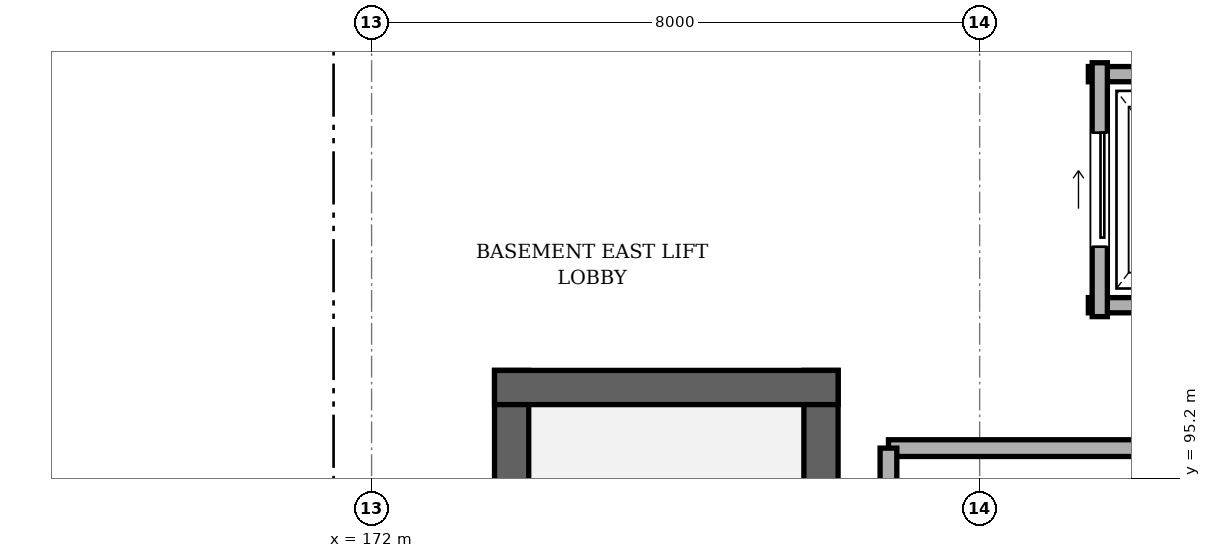
"""IFC4 building model, lengths in metres.
Left out: names, types, materials, properties, quantities, classifications, styles, units other than length and angle.
Written with IfcOpenShell. Run it as: python <this file> out.ifc"""

import sys

from ifc_helpers import new_model, si_unit, direction, frame, frame_2d, origin, place, context, subcontext, project, spatial, rectangle, extrude, element, fill, save


model = new_model("IFC4")
c1 = context("Model", 3, precision=1e-05, world=origin(), true_north=direction((0.0, 1.0)))
c2 = subcontext(c1, "Body", "Model", "MODEL_VIEW")
j1 = project(units=[si_unit("LENGTHUNIT", "METRE"), si_unit("PLANEANGLEUNIT", "RADIAN")], contexts=[c1])
p1 = place(None, origin())
s1 = spatial("IfcSite", under=j1, at=p1, CompositionType="ELEMENT")
p2 = place(p1, origin())
s2 = spatial("IfcBuilding", under=s1, at=p2, CompositionType="ELEMENT")
p3 = place(p2, frame((0.0, 0.0, -5.4)))
s3 = spatial("IfcBuildingStorey", under=s2, at=p3, CompositionType="ELEMENT", Elevation=-5.4)
for number, where, z_axis, x_axis in (
    (1, (177.913, 85.925, 0.0), (0.0, 0.0, 1.0), (0.0, 1.0, 0.0)),
    (2, (173.843, 96.623, 0.0), (0.0, 0.0, 1.0), (0.0, -1.0, 0.0)),
):
    element("IfcWall", number, at=place(p3, frame(where, z_axis=z_axis, x_axis=x_axis)), inside=s3, PredefinedType="SHEAR", context=c2, shape_type="SweptSolid", body=[
        extrude(rectangle(XDim=10.698, YDim=0.45, at=frame_2d((5.349, 0.0))), origin(), (0.0, 0.0, 1.0), 5.1),
    ])
p4 = place(p3, frame((178.137, 96.397, 0.0), z_axis=(0.0, 0.0, 1.0), x_axis=(-1.0, 0.0, 0.0)))
e3 = element("IfcWall", 3, at=p4, inside=s3, PredefinedType="SHEAR", context=c2, shape_type="SweptSolid", body=[
    extrude(rectangle(XDim=4.52, YDim=0.45, at=frame_2d((2.26, 0.0))), origin(), (0.0, 0.0, 1.0), 5.1),
])
for number, where, z_axis, x_axis in (
    (4, (181.43, 97.48, 0.0), (0.0, 0.0, 1.0), (1.0, 0.0, 0.0)),
    (5, (184.17, 100.52, 0.0), (0.0, 0.0, 1.0), (-1.0, 0.0, 0.0)),
):
    element("IfcWall", number, at=place(p3, frame(where, z_axis=z_axis, x_axis=x_axis)), inside=s3, PredefinedType="SOLIDWALL", context=c2, shape_type="SweptSolid", body=[
        extrude(rectangle(XDim=2.74, YDim=0.2, at=frame_2d((1.37, 0.0))), origin(), (0.0, 0.0, 1.0), 4.4),
    ])
p5 = place(p3, frame((181.58, 100.67, 0.0), z_axis=(0.0, 0.0, 1.0), x_axis=(0.0, -1.0, 0.0)))
e6 = element("IfcWall", 6, at=p5, inside=s3, PredefinedType="SOLIDWALL", context=c2, shape_type="SweptSolid", body=[
    extrude(rectangle(XDim=3.34, YDim=0.2, at=frame_2d((1.67, 0.0))), origin(), (0.0, 0.0, 1.0), 4.4),
])
p6 = place(p5, frame((0.92, 0.0, 0.0)))
e7 = element("IfcOpeningElement", 7, at=p6, cuts=e6, PredefinedType="OPENING", context=c2, shape_type="SweptSolid", body=[
    extrude(rectangle(XDim=1.5, YDim=2.2, at=frame_2d((0.75, 1.1))), frame((0.0, 0.11, 0.0), z_axis=(0.0, -1.0, 0.0), x_axis=(1.0, 0.0, 0.0)), (0.0, 0.0, 1.0), 0.22),
])
p7 = place(p3, frame((178.8, 95.6, 0.0), z_axis=(0.0, 0.0, 1.0), x_axis=(1.0, 0.0, 0.0)))
e8 = element("IfcWall", 8, at=p7, inside=s3, PredefinedType="SOLIDWALL", context=c2, shape_type="SweptSolid", body=[
    extrude(rectangle(XDim=8.4, YDim=0.22, at=frame_2d((4.2, 0.0))), origin(), (0.0, 0.0, 1.0), 4.4),
])
p8 = place(p7, frame((3.55, 0.0, 0.0)))
e9 = element("IfcOpeningElement", 9, at=p8, cuts=e8, PredefinedType="OPENING", context=c2, shape_type="SweptSolid", body=[
    extrude(rectangle(XDim=1.3, YDim=2.1, at=frame_2d((0.65, 1.05))), frame((0.0, 0.12, 0.0), z_axis=(0.0, -1.0, 0.0), x_axis=(1.0, 0.0, 0.0)), (0.0, 0.0, 1.0), 0.24),
])
p9 = place(p3, frame((178.8, 86.4, 0.0), z_axis=(0.0, 0.0, 1.0), x_axis=(0.0, 1.0, 0.0)))
e10 = element("IfcWall", 10, at=p9, inside=s3, PredefinedType="SOLIDWALL", context=c2, shape_type="SweptSolid", body=[
    extrude(rectangle(XDim=9.2, YDim=0.22, at=frame_2d((4.6, 0.0))), origin(), (0.0, 0.0, 1.0), 4.4),
])
p10 = place(p6, origin())
e11 = element("IfcDoor", 11, at=p10, inside=s3, OperationType="SLIDING_TO_LEFT", PredefinedType="DOOR", context=c2, shape_type="SweptSolid", body=[
    extrude(rectangle(XDim=1.5, YDim=2.2, at=frame_2d((0.75, 1.1))), frame((0.0, 0.025, 0.0), z_axis=(0.0, -1.0, 0.0), x_axis=(1.0, 0.0, 0.0)), (0.0, 0.0, 1.0), 0.05),
])
fill(e7, e11)
save(model, sys.argv[1])
